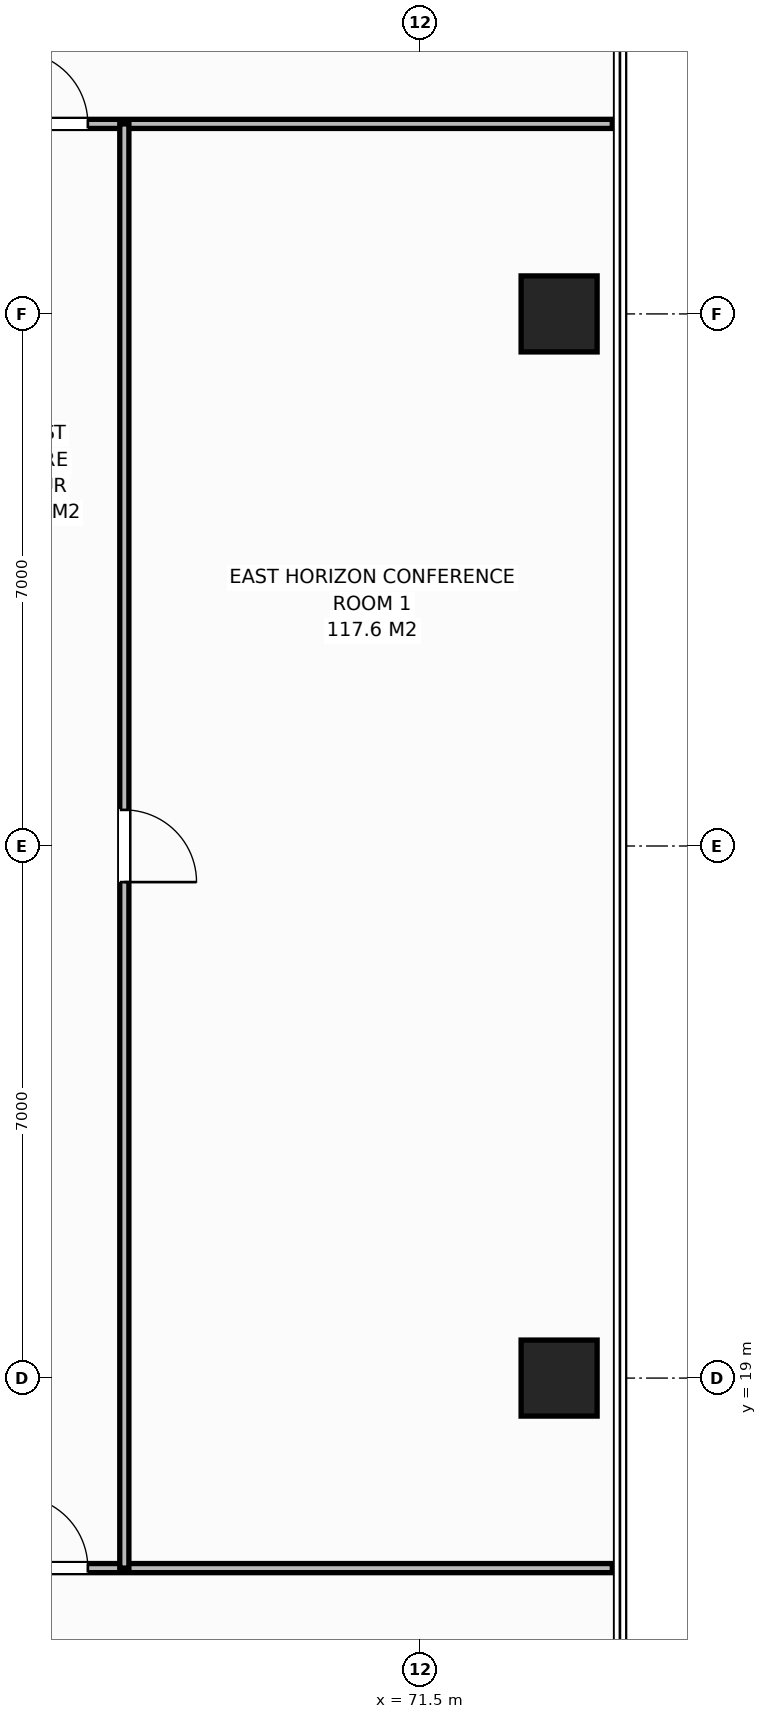
"""IFC4 building model, lengths in metres.
Left out: names, types, materials, properties, quantities, classifications, styles, units other than length and angle.
Written with IfcOpenShell. Run it as: python <this file> out.ifc"""

import sys

from ifc_helpers import new_model, si_unit, direction, frame, frame_2d, origin, origin_2d, place, context, subcontext, project, spatial, rectangle, extrude, element, fill, save


model = new_model("IFC4")
c1 = context("Model", 3, precision=1e-05, world=origin(), true_north=direction((0.0, 1.0)))
c2 = subcontext(c1, "Body", "Model", "MODEL_VIEW")
j1 = project(units=[si_unit("LENGTHUNIT", "METRE"), si_unit("PLANEANGLEUNIT", "RADIAN")], contexts=[c1])
p1 = place(None, origin())
s1 = spatial("IfcSite", under=j1, at=p1, CompositionType="ELEMENT")
p2 = place(p1, origin())
s2 = spatial("IfcBuilding", under=s1, at=p2, CompositionType="ELEMENT")
p3 = place(p2, frame((0.0, 0.0, 182.2)))
s3 = spatial("IfcBuildingStorey", under=s2, at=p3, CompositionType="ELEMENT", Elevation=182.2)
for number, where, z_axis, x_axis in (
    (1, (73.32, 19.0, 0.0), (0.0, 0.0, 1.0), (1.0, 0.0, 0.0)),
    (2, (73.32, 33.0, 0.0), (0.0, 0.0, 1.0), (1.0, 0.0, 0.0)),
):
    element("IfcColumn", number, at=place(p3, frame(where, z_axis=z_axis, x_axis=x_axis)), inside=s3, PredefinedType="COLUMN", context=c2, shape_type="SweptSolid", body=[
        extrude(rectangle(XDim=1.0, YDim=1.0, at=origin_2d()), origin(), (0.0, 0.0, 1.0), 3.8),
    ])
p4 = place(p3, frame((63.903, 35.5, 0.0), z_axis=(0.0, 0.0, 1.0), x_axis=(1.0, 0.0, 0.0)))
e3 = element("IfcWall", 3, at=p4, inside=s3, PredefinedType="PARTITIONING", context=c2, shape_type="SweptSolid", body=[
    extrude(rectangle(XDim=10.117, YDim=0.12, at=frame_2d((5.058, 0.0))), origin(), (0.0, 0.0, 1.0), 3.572),
])
p5 = place(p4, frame((2.267, 0.0, 0.0)))
e4 = element("IfcOpeningElement", 4, at=p5, cuts=e3, PredefinedType="OPENING", context=c2, shape_type="SweptSolid", body=[
    extrude(rectangle(XDim=0.95, YDim=2.15, at=frame_2d((0.475, 1.075))), frame((0.0, 0.07, 0.0), z_axis=(0.0, -1.0, 0.0), x_axis=(1.0, 0.0, 0.0)), (0.0, 0.0, 1.0), 0.14),
])
p6 = place(p3, frame((64.86, 16.5, 0.0), z_axis=(0.0, 0.0, 1.0), x_axis=(1.0, 0.0, 0.0)))
e5 = element("IfcWall", 5, at=p6, inside=s3, PredefinedType="PARTITIONING", context=c2, shape_type="SweptSolid", body=[
    extrude(rectangle(XDim=9.16, YDim=0.12, at=frame_2d((4.58, 0.0))), origin(), (0.0, 0.0, 1.0), 3.572),
])
p7 = place(p6, frame((1.31, 0.0, 0.0)))
e6 = element("IfcOpeningElement", 6, at=p7, cuts=e5, PredefinedType="OPENING", context=c2, shape_type="SweptSolid", body=[
    extrude(rectangle(XDim=0.95, YDim=2.15, at=frame_2d((0.475, 1.075))), frame((0.0, 0.07, 0.0), z_axis=(0.0, -1.0, 0.0), x_axis=(1.0, 0.0, 0.0)), (0.0, 0.0, 1.0), 0.14),
])
p8 = place(p3, frame((67.6, 16.5, 0.0), z_axis=(0.0, 0.0, 1.0), x_axis=(0.0, 1.0, 0.0)))
e7 = element("IfcWall", 7, at=p8, inside=s3, PredefinedType="PARTITIONING", context=c2, shape_type="SweptSolid", body=[
    extrude(rectangle(XDim=19.0, YDim=0.12, at=frame_2d((9.5, 0.0))), origin(), (0.0, 0.0, 1.0), 3.572),
])
p9 = place(p8, frame((9.025, 0.0, 0.0)))
e8 = element("IfcOpeningElement", 8, at=p9, cuts=e7, PredefinedType="OPENING", context=c2, shape_type="SweptSolid", body=[
    extrude(rectangle(XDim=0.95, YDim=2.15, at=frame_2d((0.475, 1.075))), frame((0.0, 0.07, 0.0), z_axis=(0.0, -1.0, 0.0), x_axis=(1.0, 0.0, 0.0)), (0.0, 0.0, 1.0), 0.14),
])
p10 = place(p5, origin())
e9 = element("IfcDoor", 9, at=p10, inside=s3, OperationType="SINGLE_SWING_LEFT", PredefinedType="DOOR", context=c2, shape_type="SweptSolid", body=[
    extrude(rectangle(XDim=0.95, YDim=2.15, at=frame_2d((0.475, 1.075))), frame((0.0, 0.025, 0.0), z_axis=(0.0, -1.0, 0.0), x_axis=(1.0, 0.0, 0.0)), (0.0, 0.0, 1.0), 0.05),
])
fill(e4, e9)
p11 = place(p7, origin())
e10 = element("IfcDoor", 10, at=p11, inside=s3, OperationType="SINGLE_SWING_LEFT", PredefinedType="DOOR", context=c2, shape_type="SweptSolid", body=[
    extrude(rectangle(XDim=0.95, YDim=2.15, at=frame_2d((0.475, 1.075))), frame((0.0, 0.025, 0.0), z_axis=(0.0, -1.0, 0.0), x_axis=(1.0, 0.0, 0.0)), (0.0, 0.0, 1.0), 0.05),
])
fill(e6, e10)
p12 = place(p9, origin())
e11 = element("IfcDoor", 11, at=p12, inside=s3, OperationType="SINGLE_SWING_RIGHT", PredefinedType="DOOR", context=c2, shape_type="SweptSolid", body=[
    extrude(rectangle(XDim=0.95, YDim=2.15, at=frame_2d((0.475, 1.075))), frame((0.0, 0.025, 0.0), z_axis=(0.0, -1.0, 0.0), x_axis=(1.0, 0.0, 0.0)), (0.0, 0.0, 1.0), 0.05),
])
fill(e8, e11)
save(model, sys.argv[1])
